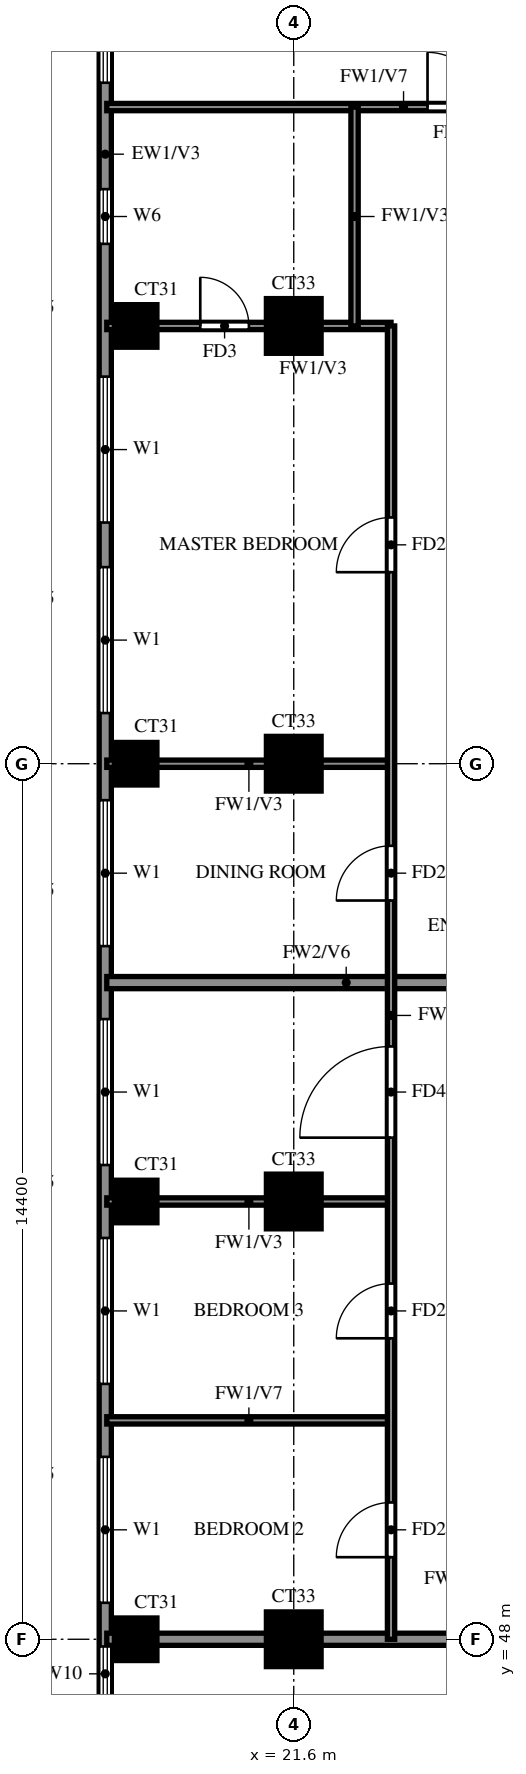
"""IFC4 building model, lengths in metres.
Left out: names, types, materials, properties, quantities, classifications, styles, units other than length and angle.
Written with IfcOpenShell. Run it as: python <this file> out.ifc"""

import sys

from ifc_helpers import new_model, si_unit, direction, frame, frame_2d, origin, origin_2d, place, context, subcontext, project, spatial, rectangle, extrude, source, transform, mapped, element, fill, save


model = new_model("IFC4")
c1 = context("Model", 3, precision=1e-05, world=origin(), true_north=direction((0.0, 1.0)))
c2 = subcontext(c1, "Body", "Model", "MODEL_VIEW")
j1 = project(units=[si_unit("LENGTHUNIT", "METRE"), si_unit("PLANEANGLEUNIT", "RADIAN")], contexts=[c1])
p1 = place(None, origin())
s1 = spatial("IfcSite", under=j1, at=p1, CompositionType="ELEMENT")
p2 = place(p1, origin())
s2 = spatial("IfcBuilding", under=s1, at=p2, CompositionType="ELEMENT")
p3 = place(p2, frame((0.0, 0.0, 211.5)))
s3 = spatial("IfcBuildingStorey", under=s2, at=p3, CompositionType="ELEMENT", Elevation=211.5)
m1 = source(origin(), c2, "Body", "SweptSolid", [
    extrude(rectangle(XDim=0.7, YDim=0.7, at=origin_2d()), origin(), (0.0, 0.0, 1.0), 3.5),
])
p4 = place(p3, frame((19.0, 48.0, -0.28), z_axis=(0.0, 0.0, 1.0), x_axis=(1.0, 0.0, 0.0)))
e1 = element("IfcColumn", 1, at=p4, inside=s3, PredefinedType="COLUMN", context=c2, shape_type="MappedRepresentation", body=[
    mapped(m1, transform((0.0, 0.0, 0.0))),
])
m2 = source(origin(), c2, "Body", "SweptSolid", [
    extrude(rectangle(XDim=0.9, YDim=0.9, at=origin_2d()), origin(), (0.0, 0.0, 1.0), 3.22),
])
p5 = place(p3, frame((21.6, 48.0, 0.0), z_axis=(0.0, 0.0, 1.0), x_axis=(1.0, 0.0, 0.0)))
e2 = element("IfcColumn", 2, at=p5, inside=s3, PredefinedType="COLUMN", context=c2, shape_type="MappedRepresentation", body=[
    mapped(m2, transform((0.0, 0.0, 0.0))),
])
p6 = place(p3, frame((19.0, 55.2, -0.28), z_axis=(0.0, 0.0, 1.0), x_axis=(1.0, 0.0, 0.0)))
e3 = element("IfcColumn", 3, at=p6, inside=s3, PredefinedType="COLUMN", context=c2, shape_type="MappedRepresentation", body=[
    mapped(m1, transform((0.0, 0.0, 0.0))),
])
p7 = place(p3, frame((21.6, 55.2, 0.0), z_axis=(0.0, 0.0, 1.0), x_axis=(1.0, 0.0, 0.0)))
e4 = element("IfcColumn", 4, at=p7, inside=s3, PredefinedType="COLUMN", context=c2, shape_type="MappedRepresentation", body=[
    mapped(m2, transform((0.0, 0.0, 0.0))),
])
p8 = place(p3, frame((19.0, 62.4, -0.28), z_axis=(0.0, 0.0, 1.0), x_axis=(1.0, 0.0, 0.0)))
e5 = element("IfcColumn", 5, at=p8, inside=s3, PredefinedType="COLUMN", context=c2, shape_type="MappedRepresentation", body=[
    mapped(m1, transform((0.0, 0.0, 0.0))),
])
p9 = place(p3, frame((21.6, 62.4, 0.0), z_axis=(0.0, 0.0, 1.0), x_axis=(1.0, 0.0, 0.0)))
e6 = element("IfcColumn", 6, at=p9, inside=s3, PredefinedType="COLUMN", context=c2, shape_type="MappedRepresentation", body=[
    mapped(m2, transform((0.0, 0.0, 0.0))),
])
p10 = place(p3, frame((19.0, 69.6, -0.28), z_axis=(0.0, 0.0, 1.0), x_axis=(1.0, 0.0, 0.0)))
e7 = element("IfcColumn", 7, at=p10, inside=s3, PredefinedType="COLUMN", context=c2, shape_type="MappedRepresentation", body=[
    mapped(m1, transform((0.0, 0.0, 0.0))),
])
p11 = place(p3, frame((21.6, 69.6, 0.0), z_axis=(0.0, 0.0, 1.0), x_axis=(1.0, 0.0, 0.0)))
e8 = element("IfcColumn", 8, at=p11, inside=s3, PredefinedType="COLUMN", context=c2, shape_type="MappedRepresentation", body=[
    mapped(m2, transform((0.0, 0.0, 0.0))),
])
p12 = place(p3, frame((18.5, 76.6, 0.0), z_axis=(0.0, 0.0, 1.0), x_axis=(0.0, -1.0, 0.0)))
e9 = element("IfcWall", 9, at=p12, inside=s3, PredefinedType="SOLIDWALL", context=c2, shape_type="SweptSolid", body=[
    extrude(rectangle(XDim=33.4, YDim=0.2, at=frame_2d((16.7, 0.0))), origin(), (0.0, 0.0, 1.0), 3.22),
])
p13 = place(p12, frame((30.037, 0.0, 0.0)))
e10 = element("IfcOpeningElement", 10, at=p13, cuts=e9, PredefinedType="OPENING", context=c2, shape_type="SweptSolid", body=[
    extrude(rectangle(XDim=1.8, YDim=2.4, at=frame_2d((0.9, 1.2))), frame((0.0, 0.11, 0.0), z_axis=(0.0, -1.0, 0.0), x_axis=(1.0, 0.0, 0.0)), (0.0, 0.0, 1.0), 0.22),
])
p14 = place(p12, frame((28.719, 0.0, 0.6)))
e11 = element("IfcOpeningElement", 11, at=p14, cuts=e9, PredefinedType="OPENING", context=c2, shape_type="SweptSolid", body=[
    extrude(rectangle(XDim=0.9, YDim=2.4, at=frame_2d((0.45, 1.2))), frame((0.0, 0.11, 0.0), z_axis=(0.0, -1.0, 0.0), x_axis=(1.0, 0.0, 0.0)), (0.0, 0.0, 1.0), 0.22),
])
p15 = place(p12, frame((25.6, 0.0, 0.6)))
e12 = element("IfcOpeningElement", 12, at=p15, cuts=e9, PredefinedType="OPENING", context=c2, shape_type="SweptSolid", body=[
    extrude(rectangle(XDim=2.4, YDim=2.4, at=frame_2d((1.2, 1.2))), frame((0.0, 0.11, 0.0), z_axis=(0.0, -1.0, 0.0), x_axis=(1.0, 0.0, 0.0)), (0.0, 0.0, 1.0), 0.22),
])
p16 = place(p12, frame((22.0, 0.0, 0.6)))
e13 = element("IfcOpeningElement", 13, at=p16, cuts=e9, PredefinedType="OPENING", context=c2, shape_type="SweptSolid", body=[
    extrude(rectangle(XDim=2.4, YDim=2.4, at=frame_2d((1.2, 1.2))), frame((0.0, 0.11, 0.0), z_axis=(0.0, -1.0, 0.0), x_axis=(1.0, 0.0, 0.0)), (0.0, 0.0, 1.0), 0.22),
])
p17 = place(p12, frame((18.4, 0.0, 0.6)))
e14 = element("IfcOpeningElement", 14, at=p17, cuts=e9, PredefinedType="OPENING", context=c2, shape_type="SweptSolid", body=[
    extrude(rectangle(XDim=2.4, YDim=2.4, at=frame_2d((1.2, 1.2))), frame((0.0, 0.11, 0.0), z_axis=(0.0, -1.0, 0.0), x_axis=(1.0, 0.0, 0.0)), (0.0, 0.0, 1.0), 0.22),
])
p18 = place(p12, frame((14.8, 0.0, 0.6)))
e15 = element("IfcOpeningElement", 15, at=p18, cuts=e9, PredefinedType="OPENING", context=c2, shape_type="SweptSolid", body=[
    extrude(rectangle(XDim=2.4, YDim=2.4, at=frame_2d((1.2, 1.2))), frame((0.0, 0.11, 0.0), z_axis=(0.0, -1.0, 0.0), x_axis=(1.0, 0.0, 0.0)), (0.0, 0.0, 1.0), 0.22),
])
p19 = place(p12, frame((7.833, 0.0, 0.6)))
e16 = element("IfcOpeningElement", 16, at=p19, cuts=e9, PredefinedType="OPENING", context=c2, shape_type="SweptSolid", body=[
    extrude(rectangle(XDim=2.4, YDim=2.4, at=frame_2d((1.2, 1.2))), frame((0.0, 0.11, 0.0), z_axis=(0.0, -1.0, 0.0), x_axis=(1.0, 0.0, 0.0)), (0.0, 0.0, 1.0), 0.22),
])
p20 = place(p12, frame((10.967, 0.0, 0.6)))
e17 = element("IfcOpeningElement", 17, at=p20, cuts=e9, PredefinedType="OPENING", context=c2, shape_type="SweptSolid", body=[
    extrude(rectangle(XDim=2.4, YDim=2.4, at=frame_2d((1.2, 1.2))), frame((0.0, 0.11, 0.0), z_axis=(0.0, -1.0, 0.0), x_axis=(1.0, 0.0, 0.0)), (0.0, 0.0, 1.0), 0.22),
])
p21 = place(p12, frame((4.75, 0.0, 1.5)))
e18 = element("IfcOpeningElement", 18, at=p21, cuts=e9, PredefinedType="OPENING", context=c2, shape_type="SweptSolid", body=[
    extrude(rectangle(XDim=0.9, YDim=0.9, at=frame_2d((0.45, 0.45))), frame((0.0, 0.11, 0.0), z_axis=(0.0, -1.0, 0.0), x_axis=(1.0, 0.0, 0.0)), (0.0, 0.0, 1.0), 0.22),
])
p22 = place(p12, frame((0.6, 0.0, 0.6)))
e19 = element("IfcOpeningElement", 19, at=p22, cuts=e9, PredefinedType="OPENING", context=c2, shape_type="SweptSolid", body=[
    extrude(rectangle(XDim=2.4, YDim=2.4, at=frame_2d((1.2, 1.2))), frame((0.0, 0.11, 0.0), z_axis=(0.0, -1.0, 0.0), x_axis=(1.0, 0.0, 0.0)), (0.0, 0.0, 1.0), 0.22),
])
p23 = place(p3, frame((18.525, 48.0, 0.0), z_axis=(0.0, 0.0, 1.0), x_axis=(1.0, 0.0, 0.0)))
e20 = element("IfcWall", 20, at=p23, inside=s3, PredefinedType="SOLIDWALL", context=c2, shape_type="SweptSolid", body=[
    extrude(rectangle(XDim=15.075, YDim=0.2, at=frame_2d((7.538, 0.0))), origin(), (0.0, 0.0, 1.0), 3.22),
])
p24 = place(p3, frame((18.525, 58.8, 0.0), z_axis=(0.0, 0.0, 1.0), x_axis=(1.0, 0.0, 0.0)))
e21 = element("IfcWall", 21, at=p24, inside=s3, PredefinedType="SOLIDWALL", context=c2, shape_type="SweptSolid", body=[
    extrude(rectangle(XDim=7.875, YDim=0.2, at=frame_2d((3.938, 0.0))), origin(), (0.0, 0.0, 1.0), 2.32),
])
p25 = place(p3, frame((18.525, 51.6, 0.0), z_axis=(0.0, 0.0, 1.0), x_axis=(1.0, 0.0, 0.0)))
e22 = element("IfcWall", 22, at=p25, inside=s3, PredefinedType="PARTITIONING", context=c2, shape_type="SweptSolid", body=[
    extrude(rectangle(XDim=4.675, YDim=0.12, at=frame_2d((2.337, 0.0))), origin(), (0.0, 0.0, 1.0), 2.32),
])
for number, where, z_axis, x_axis in (
    (23, (18.525, 55.2, 0.0), (0.0, 0.0, 1.0), (1.0, 0.0, 0.0)),
    (24, (18.525, 62.4, 0.0), (0.0, 0.0, 1.0), (1.0, 0.0, 0.0)),
):
    element("IfcWall", number, at=place(p3, frame(where, z_axis=z_axis, x_axis=x_axis)), inside=s3, PredefinedType="PARTITIONING", context=c2, shape_type="SweptSolid", body=[
        extrude(rectangle(XDim=4.675, YDim=0.12, at=frame_2d((2.337, 0.0))), origin(), (0.0, 0.0, 1.0), 3.22),
    ])
p26 = place(p3, frame((18.525, 69.6, 0.0), z_axis=(0.0, 0.0, 1.0), x_axis=(1.0, 0.0, 0.0)))
e25 = element("IfcWall", 25, at=p26, inside=s3, PredefinedType="PARTITIONING", context=c2, shape_type="SweptSolid", body=[
    extrude(rectangle(XDim=4.675, YDim=0.12, at=frame_2d((2.337, 0.0))), origin(), (0.0, 0.0, 1.0), 3.22),
])
p27 = place(p26, frame((1.538, 0.0, 0.0)))
e26 = element("IfcOpeningElement", 26, at=p27, cuts=e25, PredefinedType="OPENING", context=c2, shape_type="SweptSolid", body=[
    extrude(rectangle(XDim=0.8, YDim=2.1, at=frame_2d((0.4, 1.05))), frame((0.0, 0.07, 0.0), z_axis=(0.0, -1.0, 0.0), x_axis=(1.0, 0.0, 0.0)), (0.0, 0.0, 1.0), 0.14),
])
p28 = place(p3, frame((18.525, 73.2, 0.0), z_axis=(0.0, 0.0, 1.0), x_axis=(1.0, 0.0, 0.0)))
e27 = element("IfcWall", 27, at=p28, inside=s3, PredefinedType="PARTITIONING", context=c2, shape_type="SweptSolid", body=[
    extrude(rectangle(XDim=10.275, YDim=0.12, at=frame_2d((5.138, 0.0))), origin(), (0.0, 0.0, 1.0), 2.32),
])
p29 = place(p28, frame((5.275, 0.0, 0.0)))
e28 = element("IfcOpeningElement", 28, at=p29, cuts=e27, PredefinedType="OPENING", context=c2, shape_type="SweptSolid", body=[
    extrude(rectangle(XDim=0.9, YDim=2.1, at=frame_2d((0.45, 1.05))), frame((0.0, 0.07, 0.0), z_axis=(0.0, -1.0, 0.0), x_axis=(1.0, 0.0, 0.0)), (0.0, 0.0, 1.0), 0.14),
])
p30 = place(p3, frame((22.6, 69.6, 0.0), z_axis=(0.0, 0.0, 1.0), x_axis=(0.0, 1.0, 0.0)))
e29 = element("IfcWall", 29, at=p30, inside=s3, PredefinedType="PARTITIONING", context=c2, shape_type="SweptSolid", body=[
    extrude(rectangle(XDim=3.6, YDim=0.12, at=frame_2d((1.8, 0.0))), origin(), (0.0, 0.0, 1.0), 3.22),
])
p31 = place(p3, frame((23.2, 48.0, 0.0), z_axis=(0.0, 0.0, 1.0), x_axis=(0.0, 1.0, 0.0)))
e30 = element("IfcWall", 30, at=p31, inside=s3, PredefinedType="PARTITIONING", context=c2, shape_type="SweptSolid", body=[
    extrude(rectangle(XDim=21.6, YDim=0.12, at=frame_2d((10.8, 0.0))), origin(), (0.0, 0.0, 1.0), 3.22),
])
p32 = place(p31, frame((1.35, 0.0, 0.0)))
e31 = element("IfcOpeningElement", 31, at=p32, cuts=e30, PredefinedType="OPENING", context=c2, shape_type="SweptSolid", body=[
    extrude(rectangle(XDim=0.9, YDim=2.1, at=frame_2d((0.45, 1.05))), frame((0.0, 0.07, 0.0), z_axis=(0.0, -1.0, 0.0), x_axis=(1.0, 0.0, 0.0)), (0.0, 0.0, 1.0), 0.14),
])
p33 = place(p31, frame((4.95, 0.0, 0.0)))
e32 = element("IfcOpeningElement", 32, at=p33, cuts=e30, PredefinedType="OPENING", context=c2, shape_type="SweptSolid", body=[
    extrude(rectangle(XDim=0.9, YDim=2.1, at=frame_2d((0.45, 1.05))), frame((0.0, 0.07, 0.0), z_axis=(0.0, -1.0, 0.0), x_axis=(1.0, 0.0, 0.0)), (0.0, 0.0, 1.0), 0.14),
])
p34 = place(p31, frame((8.25, 0.0, 0.0)))
e33 = element("IfcOpeningElement", 33, at=p34, cuts=e30, PredefinedType="OPENING", context=c2, shape_type="SweptSolid", body=[
    extrude(rectangle(XDim=1.5, YDim=2.1, at=frame_2d((0.75, 1.05))), frame((0.0, 0.07, 0.0), z_axis=(0.0, -1.0, 0.0), x_axis=(1.0, 0.0, 0.0)), (0.0, 0.0, 1.0), 0.14),
])
p35 = place(p31, frame((12.15, 0.0, 0.0)))
e34 = element("IfcOpeningElement", 34, at=p35, cuts=e30, PredefinedType="OPENING", context=c2, shape_type="SweptSolid", body=[
    extrude(rectangle(XDim=0.9, YDim=2.1, at=frame_2d((0.45, 1.05))), frame((0.0, 0.07, 0.0), z_axis=(0.0, -1.0, 0.0), x_axis=(1.0, 0.0, 0.0)), (0.0, 0.0, 1.0), 0.14),
])
p36 = place(p31, frame((17.55, 0.0, 0.0)))
e35 = element("IfcOpeningElement", 35, at=p36, cuts=e30, PredefinedType="OPENING", context=c2, shape_type="SweptSolid", body=[
    extrude(rectangle(XDim=0.9, YDim=2.1, at=frame_2d((0.45, 1.05))), frame((0.0, 0.07, 0.0), z_axis=(0.0, -1.0, 0.0), x_axis=(1.0, 0.0, 0.0)), (0.0, 0.0, 1.0), 0.14),
])
p37 = place(p14, origin())
e36 = element("IfcWindow", 36, at=p37, inside=s3, PartitioningType="SINGLE_PANEL", PredefinedType="WINDOW", context=c2, shape_type="SweptSolid", body=[
    extrude(rectangle(XDim=0.9, YDim=2.4, at=frame_2d((0.45, 1.2))), frame((0.0, 0.03, 0.0), z_axis=(0.0, -1.0, 0.0), x_axis=(1.0, 0.0, 0.0)), (0.0, 0.0, 1.0), 0.06),
])
fill(e11, e36)
p38 = place(p15, origin())
e37 = element("IfcWindow", 37, at=p38, inside=s3, PartitioningType="DOUBLE_PANEL_VERTICAL", PredefinedType="WINDOW", context=c2, shape_type="SweptSolid", body=[
    extrude(rectangle(XDim=2.4, YDim=2.4, at=frame_2d((1.2, 1.2))), frame((0.0, 0.03, 0.0), z_axis=(0.0, -1.0, 0.0), x_axis=(1.0, 0.0, 0.0)), (0.0, 0.0, 1.0), 0.06),
])
fill(e12, e37)
p39 = place(p16, origin())
e38 = element("IfcWindow", 38, at=p39, inside=s3, PartitioningType="DOUBLE_PANEL_VERTICAL", PredefinedType="WINDOW", context=c2, shape_type="SweptSolid", body=[
    extrude(rectangle(XDim=2.4, YDim=2.4, at=frame_2d((1.2, 1.2))), frame((0.0, 0.03, 0.0), z_axis=(0.0, -1.0, 0.0), x_axis=(1.0, 0.0, 0.0)), (0.0, 0.0, 1.0), 0.06),
])
fill(e13, e38)
p40 = place(p17, origin())
e39 = element("IfcWindow", 39, at=p40, inside=s3, PartitioningType="DOUBLE_PANEL_VERTICAL", PredefinedType="WINDOW", context=c2, shape_type="SweptSolid", body=[
    extrude(rectangle(XDim=2.4, YDim=2.4, at=frame_2d((1.2, 1.2))), frame((0.0, 0.03, 0.0), z_axis=(0.0, -1.0, 0.0), x_axis=(1.0, 0.0, 0.0)), (0.0, 0.0, 1.0), 0.06),
])
fill(e14, e39)
p41 = place(p18, origin())
e40 = element("IfcWindow", 40, at=p41, inside=s3, PartitioningType="DOUBLE_PANEL_VERTICAL", PredefinedType="WINDOW", context=c2, shape_type="SweptSolid", body=[
    extrude(rectangle(XDim=2.4, YDim=2.4, at=frame_2d((1.2, 1.2))), frame((0.0, 0.03, 0.0), z_axis=(0.0, -1.0, 0.0), x_axis=(1.0, 0.0, 0.0)), (0.0, 0.0, 1.0), 0.06),
])
fill(e15, e40)
p42 = place(p19, origin())
e41 = element("IfcWindow", 41, at=p42, inside=s3, PartitioningType="DOUBLE_PANEL_VERTICAL", PredefinedType="WINDOW", context=c2, shape_type="SweptSolid", body=[
    extrude(rectangle(XDim=2.4, YDim=2.4, at=frame_2d((1.2, 1.2))), frame((0.0, 0.03, 0.0), z_axis=(0.0, -1.0, 0.0), x_axis=(1.0, 0.0, 0.0)), (0.0, 0.0, 1.0), 0.06),
])
fill(e16, e41)
p43 = place(p20, origin())
e42 = element("IfcWindow", 42, at=p43, inside=s3, PartitioningType="DOUBLE_PANEL_VERTICAL", PredefinedType="WINDOW", context=c2, shape_type="SweptSolid", body=[
    extrude(rectangle(XDim=2.4, YDim=2.4, at=frame_2d((1.2, 1.2))), frame((0.0, 0.03, 0.0), z_axis=(0.0, -1.0, 0.0), x_axis=(1.0, 0.0, 0.0)), (0.0, 0.0, 1.0), 0.06),
])
fill(e17, e42)
p44 = place(p21, origin())
e43 = element("IfcWindow", 43, at=p44, inside=s3, PartitioningType="SINGLE_PANEL", PredefinedType="WINDOW", context=c2, shape_type="SweptSolid", body=[
    extrude(rectangle(XDim=0.9, YDim=0.9, at=frame_2d((0.45, 0.45))), frame((0.0, 0.03, 0.0), z_axis=(0.0, -1.0, 0.0), x_axis=(1.0, 0.0, 0.0)), (0.0, 0.0, 1.0), 0.06),
])
fill(e18, e43)
p45 = place(p22, origin())
e44 = element("IfcWindow", 44, at=p45, inside=s3, PartitioningType="DOUBLE_PANEL_VERTICAL", PredefinedType="WINDOW", context=c2, shape_type="SweptSolid", body=[
    extrude(rectangle(XDim=2.4, YDim=2.4, at=frame_2d((1.2, 1.2))), frame((0.0, 0.03, 0.0), z_axis=(0.0, -1.0, 0.0), x_axis=(1.0, 0.0, 0.0)), (0.0, 0.0, 1.0), 0.06),
])
fill(e19, e44)
p46 = place(p32, origin())
e45 = element("IfcDoor", 45, at=p46, inside=s3, OperationType="SINGLE_SWING_RIGHT", PredefinedType="DOOR", context=c2, shape_type="SweptSolid", body=[
    extrude(rectangle(XDim=0.9, YDim=2.1, at=frame_2d((0.45, 1.05))), frame((0.0, 0.025, 0.0), z_axis=(0.0, -1.0, 0.0), x_axis=(1.0, 0.0, 0.0)), (0.0, 0.0, 1.0), 0.05),
])
fill(e31, e45)
p47 = place(p33, origin())
e46 = element("IfcDoor", 46, at=p47, inside=s3, OperationType="SINGLE_SWING_LEFT", PredefinedType="DOOR", context=c2, shape_type="SweptSolid", body=[
    extrude(rectangle(XDim=0.9, YDim=2.1, at=frame_2d((0.45, 1.05))), frame((0.0, 0.025, 0.0), z_axis=(0.0, -1.0, 0.0), x_axis=(1.0, 0.0, 0.0)), (0.0, 0.0, 1.0), 0.05),
])
fill(e32, e46)
p48 = place(p34, origin())
e47 = element("IfcDoor", 47, at=p48, inside=s3, OperationType="SINGLE_SWING_LEFT", PredefinedType="DOOR", context=c2, shape_type="SweptSolid", body=[
    extrude(rectangle(XDim=1.5, YDim=2.1, at=frame_2d((0.75, 1.05))), frame((0.0, 0.025, 0.0), z_axis=(0.0, -1.0, 0.0), x_axis=(1.0, 0.0, 0.0)), (0.0, 0.0, 1.0), 0.05),
])
fill(e33, e47)
p49 = place(p35, origin())
e48 = element("IfcDoor", 48, at=p49, inside=s3, OperationType="SINGLE_SWING_LEFT", PredefinedType="DOOR", context=c2, shape_type="SweptSolid", body=[
    extrude(rectangle(XDim=0.9, YDim=2.1, at=frame_2d((0.45, 1.05))), frame((0.0, 0.025, 0.0), z_axis=(0.0, -1.0, 0.0), x_axis=(1.0, 0.0, 0.0)), (0.0, 0.0, 1.0), 0.05),
])
fill(e34, e48)
p50 = place(p36, origin())
e49 = element("IfcDoor", 49, at=p50, inside=s3, OperationType="SINGLE_SWING_RIGHT", PredefinedType="DOOR", context=c2, shape_type="SweptSolid", body=[
    extrude(rectangle(XDim=0.9, YDim=2.1, at=frame_2d((0.45, 1.05))), frame((0.0, 0.025, 0.0), z_axis=(0.0, -1.0, 0.0), x_axis=(1.0, 0.0, 0.0)), (0.0, 0.0, 1.0), 0.05),
])
fill(e35, e49)
p51 = place(p27, origin())
e50 = element("IfcDoor", 50, at=p51, inside=s3, OperationType="SINGLE_SWING_RIGHT", PredefinedType="DOOR", context=c2, shape_type="SweptSolid", body=[
    extrude(rectangle(XDim=0.8, YDim=2.1, at=frame_2d((0.4, 1.05))), frame((0.0, 0.025, 0.0), z_axis=(0.0, -1.0, 0.0), x_axis=(1.0, 0.0, 0.0)), (0.0, 0.0, 1.0), 0.05),
])
fill(e26, e50)
p52 = place(p29, origin())
e51 = element("IfcDoor", 51, at=p52, inside=s3, OperationType="SINGLE_SWING_LEFT", PredefinedType="DOOR", context=c2, shape_type="SweptSolid", body=[
    extrude(rectangle(XDim=0.9, YDim=2.1, at=frame_2d((0.45, 1.05))), frame((0.0, 0.025, 0.0), z_axis=(0.0, -1.0, 0.0), x_axis=(1.0, 0.0, 0.0)), (0.0, 0.0, 1.0), 0.05),
])
fill(e28, e51)
save(model, sys.argv[1])
